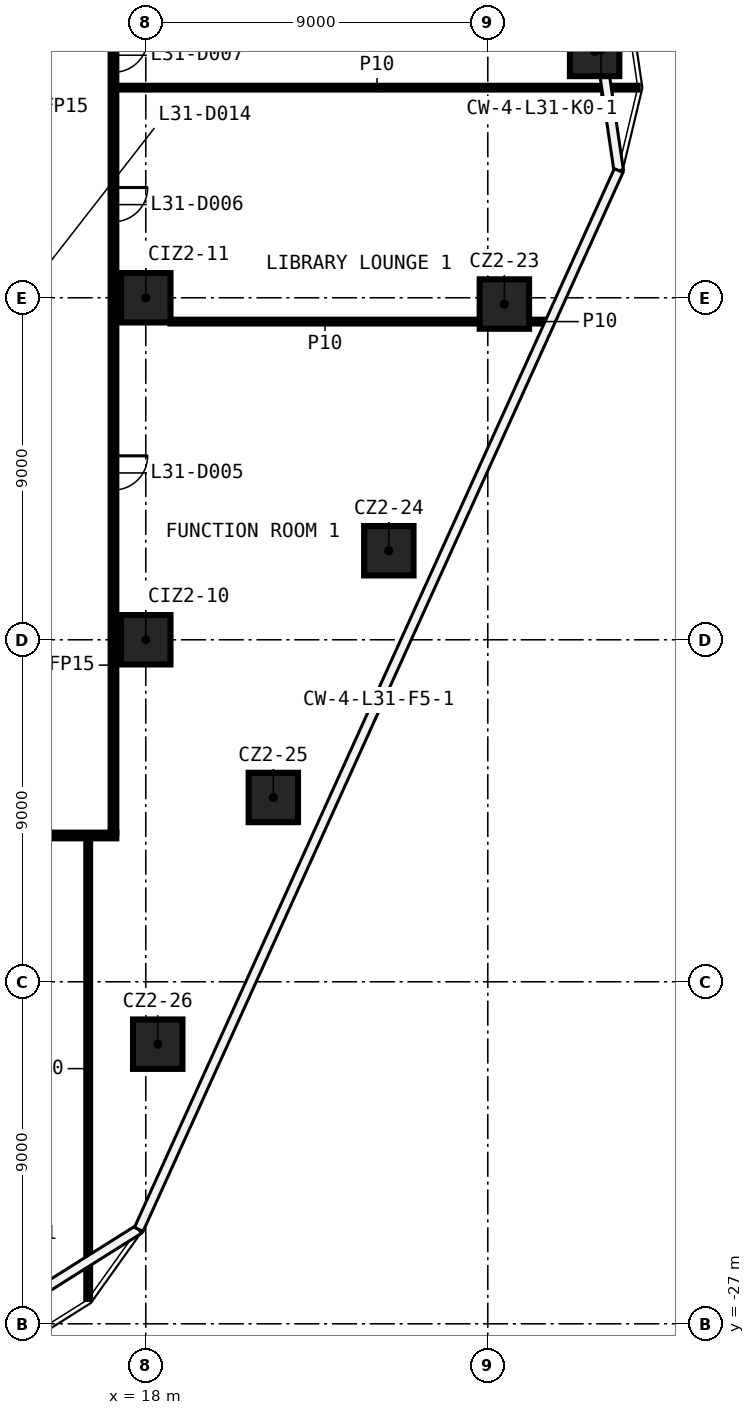
"""IFC4 building model, lengths in metres.
Left out: names, types, materials, properties, quantities, classifications, styles, units other than length and angle.
Written with IfcOpenShell. Run it as: python <this file> out.ifc"""

import sys

from ifc_helpers import new_model, si_unit, direction, frame, frame_2d, origin, origin_2d, place, context, subcontext, project, spatial, rectangle, extrude, element, fill, save


model = new_model("IFC4")
c1 = context("Model", 3, precision=1e-05, world=origin(), true_north=direction((0.0, 1.0)))
c2 = subcontext(c1, "Body", "Model", "MODEL_VIEW")
j1 = project(units=[si_unit("LENGTHUNIT", "METRE"), si_unit("PLANEANGLEUNIT", "RADIAN")], contexts=[c1])
p1 = place(None, origin())
s1 = spatial("IfcSite", under=j1, at=p1, CompositionType="ELEMENT")
p2 = place(p1, origin())
s2 = spatial("IfcBuilding", under=s1, at=p2, CompositionType="ELEMENT")
p3 = place(p2, frame((0.0, 0.0, 139.6)))
s3 = spatial("IfcBuildingStorey", under=s2, at=p3, CompositionType="ELEMENT", Elevation=139.6)
for number, where, z_axis, x_axis in (
    (1, (29.811, 6.482, 0.0), (0.0, 0.0, 1.0), (1.0, 0.0, 0.0)),
    (2, (27.436, -0.165, 0.0), (0.0, 0.0, 1.0), (1.0, 0.0, 0.0)),
    (3, (24.396, -6.657, 0.0), (0.0, 0.0, 1.0), (1.0, 0.0, 0.0)),
    (4, (21.356, -13.15, 0.0), (0.0, 0.0, 1.0), (1.0, 0.0, 0.0)),
    (5, (18.315, -19.642, 0.0), (0.0, 0.0, 1.0), (1.0, 0.0, 0.0)),
    (6, (18.0, -9.0, 0.0), (0.0, 0.0, 1.0), (1.0, 0.0, 0.0)),
    (7, (18.0, 0.0, 0.0), (0.0, 0.0, 1.0), (1.0, 0.0, 0.0)),
):
    element("IfcColumn", number, at=place(p3, frame(where, z_axis=z_axis, x_axis=x_axis)), inside=s3, PredefinedType="COLUMN", context=c2, shape_type="SweptSolid", body=[
        extrude(rectangle(XDim=1.3, YDim=1.3, at=origin_2d()), origin(), (0.0, 0.0, 1.0), 5.4),
    ])
p4 = place(p3, frame((17.225, -14.15, 0.0), z_axis=(0.0, 0.0, 1.0), x_axis=(-1.0, 0.0, 0.0)))
e8 = element("IfcWall", 8, at=p4, inside=s3, PredefinedType="PARTITIONING", context=c2, shape_type="SweptSolid", body=[
    extrude(rectangle(XDim=34.45, YDim=0.15, at=frame_2d((17.225, 0.0))), origin(), (0.0, 0.0, 1.0), 5.4),
])
p5 = place(p4, frame((31.348, 0.0, 0.0)))
e9 = element("IfcOpeningElement", 9, at=p5, cuts=e8, PredefinedType="OPENING", context=c2, shape_type="SweptSolid", body=[
    extrude(rectangle(XDim=0.9, YDim=2.1, at=frame_2d((0.45, 1.05))), frame((0.0, 0.085, 0.0), z_axis=(0.0, -1.0, 0.0), x_axis=(1.0, 0.0, 0.0)), (0.0, 0.0, 1.0), 0.17),
])
p6 = place(p4, frame((17.783, 0.0, 0.0)))
e10 = element("IfcOpeningElement", 10, at=p6, cuts=e8, PredefinedType="OPENING", context=c2, shape_type="SweptSolid", body=[
    extrude(rectangle(XDim=0.9, YDim=2.1, at=frame_2d((0.45, 1.05))), frame((0.0, 0.085, 0.0), z_axis=(0.0, -1.0, 0.0), x_axis=(1.0, 0.0, 0.0)), (0.0, 0.0, 1.0), 0.17),
])
p7 = place(p4, frame((4.598, 0.0, 0.0)))
e11 = element("IfcOpeningElement", 11, at=p7, cuts=e8, PredefinedType="OPENING", context=c2, shape_type="SweptSolid", body=[
    extrude(rectangle(XDim=0.9, YDim=2.1, at=frame_2d((0.45, 1.05))), frame((0.0, 0.085, 0.0), z_axis=(0.0, -1.0, 0.0), x_axis=(1.0, 0.0, 0.0)), (0.0, 0.0, 1.0), 0.17),
])
p8 = place(p3, frame((18.65, -0.627, 0.0), z_axis=(0.0, 0.0, 1.0), x_axis=(1.0, 0.0, 0.0)))
e12 = element("IfcWall", 12, at=p8, inside=s3, PredefinedType="PARTITIONING", context=c2, shape_type="SweptSolid", body=[
    extrude(rectangle(XDim=8.136, YDim=0.1, at=frame_2d((4.068, 0.0))), origin(), (0.0, 0.0, 1.0), 5.4),
])
p9 = place(p3, frame((28.086, -0.627, 0.0), z_axis=(0.0, 0.0, 1.0), x_axis=(1.0, 0.0, 0.0)))
e13 = element("IfcWall", 13, at=p9, inside=s3, PredefinedType="PARTITIONING", context=c2, shape_type="SweptSolid", body=[
    extrude(rectangle(XDim=0.535, YDim=0.1, at=frame_2d((0.268, 0.0))), origin(), (0.0, 0.0, 1.0), 5.4),
])
p10 = place(p3, frame((17.225, 5.529, 0.0), z_axis=(0.0, 0.0, 1.0), x_axis=(1.0, 0.0, 0.0)))
e14 = element("IfcWall", 14, at=p10, inside=s3, PredefinedType="PARTITIONING", context=c2, shape_type="SweptSolid", body=[
    extrude(rectangle(XDim=13.721, YDim=0.1, at=frame_2d((6.86, 0.0))), origin(), (0.0, 0.0, 1.0), 5.4),
])
p11 = place(p3, frame((17.15, 14.075, 0.0), z_axis=(0.0, 0.0, 1.0), x_axis=(0.0, -1.0, 0.0)))
e15 = element("IfcWall", 15, at=p11, inside=s3, PredefinedType="PARTITIONING", context=c2, shape_type="SweptSolid", body=[
    extrude(rectangle(XDim=28.15, YDim=0.15, at=frame_2d((14.075, 0.0))), origin(), (0.0, 0.0, 1.0), 5.4),
])
p12 = place(p11, frame((18.235, 0.0, 0.0)))
e16 = element("IfcOpeningElement", 16, at=p12, cuts=e15, PredefinedType="OPENING", context=c2, shape_type="SweptSolid", body=[
    extrude(rectangle(XDim=0.9, YDim=2.1, at=frame_2d((0.45, 1.05))), frame((0.0, 0.085, 0.0), z_axis=(0.0, -1.0, 0.0), x_axis=(1.0, 0.0, 0.0)), (0.0, 0.0, 1.0), 0.17),
])
p13 = place(p11, frame((11.174, 0.0, 0.0)))
e17 = element("IfcOpeningElement", 17, at=p13, cuts=e15, PredefinedType="OPENING", context=c2, shape_type="SweptSolid", body=[
    extrude(rectangle(XDim=0.9, YDim=2.1, at=frame_2d((0.45, 1.05))), frame((0.0, 0.085, 0.0), z_axis=(0.0, -1.0, 0.0), x_axis=(1.0, 0.0, 0.0)), (0.0, 0.0, 1.0), 0.17),
])
p14 = place(p11, frame((7.242, 0.0, 0.0)))
e18 = element("IfcOpeningElement", 18, at=p14, cuts=e15, PredefinedType="OPENING", context=c2, shape_type="SweptSolid", body=[
    extrude(rectangle(XDim=0.9, YDim=2.1, at=frame_2d((0.45, 1.05))), frame((0.0, 0.085, 0.0), z_axis=(0.0, -1.0, 0.0), x_axis=(1.0, 0.0, 0.0)), (0.0, 0.0, 1.0), 0.17),
])
p15 = place(p3, frame((16.485, -26.345, 0.0), z_axis=(0.0, 0.0, 1.0), x_axis=(0.0, 1.0, 0.0)))
e19 = element("IfcWall", 19, at=p15, inside=s3, PredefinedType="PARTITIONING", context=c2, shape_type="SweptSolid", body=[
    extrude(rectangle(XDim=12.12, YDim=0.1, at=frame_2d((6.06, 0.0))), origin(), (0.0, 0.0, 1.0), 5.4),
])
p16 = place(p12, origin())
e20 = element("IfcDoor", 20, at=p16, inside=s3, OperationType="SINGLE_SWING_RIGHT", PredefinedType="DOOR", context=c2, shape_type="SweptSolid", body=[
    extrude(rectangle(XDim=0.9, YDim=2.1, at=frame_2d((0.45, 1.05))), frame((0.0, 0.025, 0.0), z_axis=(0.0, -1.0, 0.0), x_axis=(1.0, 0.0, 0.0)), (0.0, 0.0, 1.0), 0.05),
])
fill(e16, e20)
p17 = place(p13, origin())
e21 = element("IfcDoor", 21, at=p17, inside=s3, OperationType="SINGLE_SWING_LEFT", PredefinedType="DOOR", context=c2, shape_type="SweptSolid", body=[
    extrude(rectangle(XDim=0.9, YDim=2.1, at=frame_2d((0.45, 1.05))), frame((0.0, 0.025, 0.0), z_axis=(0.0, -1.0, 0.0), x_axis=(1.0, 0.0, 0.0)), (0.0, 0.0, 1.0), 0.05),
])
fill(e17, e21)
p18 = place(p14, origin())
e22 = element("IfcDoor", 22, at=p18, inside=s3, OperationType="SINGLE_SWING_RIGHT", PredefinedType="DOOR", context=c2, shape_type="SweptSolid", body=[
    extrude(rectangle(XDim=0.9, YDim=2.1, at=frame_2d((0.45, 1.05))), frame((0.0, 0.025, 0.0), z_axis=(0.0, -1.0, 0.0), x_axis=(1.0, 0.0, 0.0)), (0.0, 0.0, 1.0), 0.05),
])
fill(e18, e22)
save(model, sys.argv[1])
